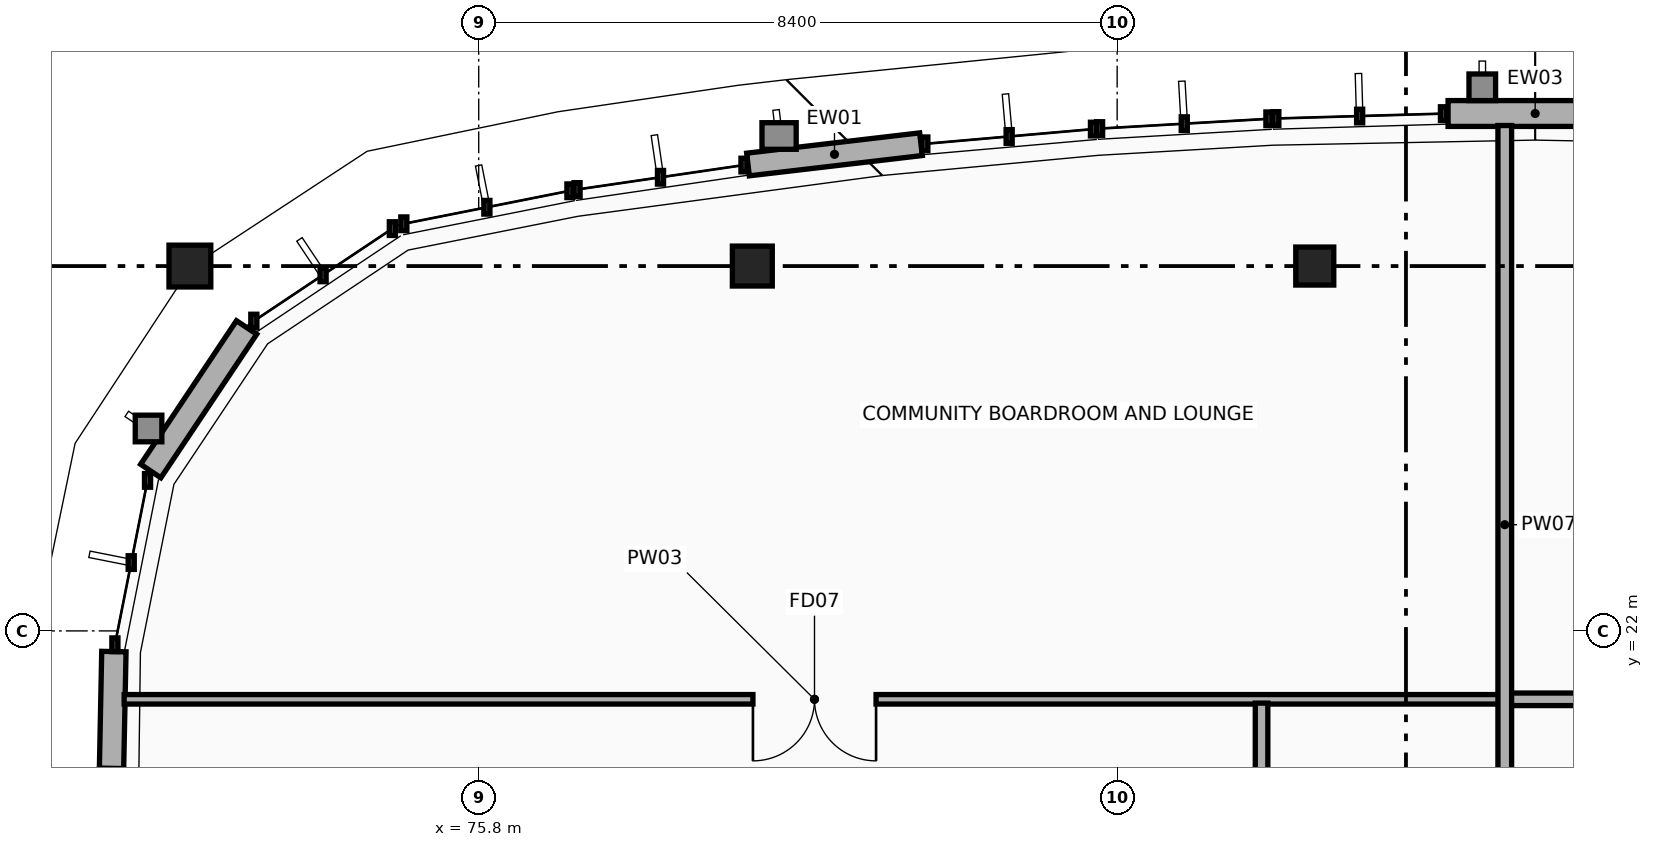
"""IFC4 building model, lengths in metres.
Left out: names, types, materials, properties, quantities, classifications, styles, units other than length and angle.
Written with IfcOpenShell. Run it as: python <this file> out.ifc"""

import sys

from ifc_helpers import new_model, si_unit, direction, frame, frame_2d, origin, origin_2d, place, context, subcontext, project, spatial, rectangle, extrude, element, fill, save


model = new_model("IFC4")
c1 = context("Model", 3, precision=1e-05, world=origin(), true_north=direction((0.0, 1.0)))
c2 = subcontext(c1, "Body", "Model", "MODEL_VIEW")
j1 = project(units=[si_unit("LENGTHUNIT", "METRE"), si_unit("PLANEANGLEUNIT", "RADIAN")], contexts=[c1])
p1 = place(None, origin())
s1 = spatial("IfcSite", under=j1, at=p1, CompositionType="ELEMENT")
p2 = place(p1, origin())
s2 = spatial("IfcBuilding", under=s1, at=p2, CompositionType="ELEMENT")
p3 = place(p2, frame((0.0, 0.0, 8.7)))
s3 = spatial("IfcBuildingStorey", under=s2, at=p3, CompositionType="ELEMENT", Elevation=8.7)
p4 = place(p3, frame((72.0, 26.8, 0.0), z_axis=(0.0, 0.0, 1.0), x_axis=(1.0, 0.0, 0.0)))
e1 = element("IfcColumn", 1, at=p4, inside=s3, PredefinedType="COLUMN", context=c2, shape_type="SweptSolid", body=[
    extrude(rectangle(XDim=0.55, YDim=0.55, at=origin_2d()), origin(), (0.0, 0.0, 1.0), 3.9),
])
p5 = place(p3, frame((79.4, 26.8, 0.0), z_axis=(0.0, 0.0, 1.0), x_axis=(1.0, 0.0, 0.0)))
e2 = element("IfcColumn", 2, at=p5, inside=s3, PredefinedType="COLUMN", context=c2, shape_type="SweptSolid", body=[
    extrude(rectangle(XDim=0.525, YDim=0.525, at=origin_2d()), origin(), (0.0, 0.0, 1.0), 3.9),
])
p6 = place(p3, frame((86.8, 26.8, 0.0), z_axis=(0.0, 0.0, 1.0), x_axis=(1.0, 0.0, 0.0)))
e3 = element("IfcColumn", 3, at=p6, inside=s3, PredefinedType="COLUMN", context=c2, shape_type="SweptSolid", body=[
    extrude(rectangle(XDim=0.5, YDim=0.5, at=origin_2d()), origin(), (0.0, 0.0, 1.0), 3.9),
])
p7 = place(p3, frame((88.554, 28.807, 0.0), z_axis=(0.0, 0.0, 1.0), x_axis=(1.0, 0.0, 0.0)))
e4 = element("IfcWall", 4, at=p7, inside=s3, PredefinedType="STANDARD", context=c2, shape_type="SweptSolid", body=[
    extrude(rectangle(XDim=2.292, YDim=0.34, at=frame_2d((1.146, 0.0))), origin(), (0.0, 0.0, 1.0), 3.664),
])
p8 = place(p3, frame((79.343, 28.136, 0.0), z_axis=(0.0, 0.0, 1.0), x_axis=(0.993184017059, 0.116556888507, 0.0)))
e5 = element("IfcWall", 5, at=p8, inside=s3, PredefinedType="STANDARD", context=c2, shape_type="SweptSolid", body=[
    extrude(rectangle(XDim=2.292, YDim=0.3, at=frame_2d((1.146, 0.0))), origin(), (0.0, 0.0, 1.0), 3.243),
])
p9 = place(p3, frame((71.485, 24.103, 0.0), z_axis=(0.0, 0.0, 1.0), x_axis=(0.555221033592, 0.831702833863, 0.0)))
e6 = element("IfcWall", 6, at=p9, inside=s3, PredefinedType="STANDARD", context=c2, shape_type="SweptSolid", body=[
    extrude(rectangle(XDim=2.271, YDim=0.32, at=frame_2d((1.136, 0.0))), origin(), (0.0, 0.0, 1.0), 3.075),
])
p10 = place(p3, frame((70.969, 20.192, 0.0), z_axis=(0.0, 0.0, 1.0), x_axis=(0.02018025071, 0.999796358006, 0.0)))
e7 = element("IfcWall", 7, at=p10, inside=s3, PredefinedType="STANDARD", context=c2, shape_type="SweptSolid", body=[
    extrude(rectangle(XDim=1.536, YDim=0.32, at=frame_2d((0.768, 0.0))), origin(), (0.0, 0.0, 1.0), 3.664),
])
p11 = place(p3, frame((89.3, 21.1, 0.0), z_axis=(0.0, 0.0, 1.0), x_axis=(-1.0, 0.0, 0.0)))
e8 = element("IfcWall", 8, at=p11, inside=s3, PredefinedType="PARTITIONING", context=c2, shape_type="SweptSolid", body=[
    extrude(rectangle(XDim=18.165, YDim=0.125, at=frame_2d((9.083, 0.0))), origin(), (0.0, 0.0, 1.0), 3.025),
])
p12 = place(p11, frame((8.272, 0.0, 0.0)))
e9 = element("IfcOpeningElement", 9, at=p12, cuts=e8, PredefinedType="OPENING", context=c2, shape_type="SweptSolid", body=[
    extrude(rectangle(XDim=1.62, YDim=2.32, at=frame_2d((0.81, 1.16))), frame((0.0, 0.073, 0.0), z_axis=(0.0, -1.0, 0.0), x_axis=(1.0, 0.0, 0.0)), (0.0, 0.0, 1.0), 0.145),
])
p13 = place(p3, frame((102.462, 21.1, 0.0), z_axis=(0.0, 0.0, 1.0), x_axis=(-1.0, 0.0, 0.0)))
e10 = element("IfcWall", 10, at=p13, inside=s3, PredefinedType="PARTITIONING", context=c2, shape_type="SweptSolid", body=[
    extrude(rectangle(XDim=13.162, YDim=0.165, at=frame_2d((6.581, 0.0))), origin(), (0.0, 0.0, 1.0), 2.95),
])
p14 = place(p13, frame((5.891, 0.0, 0.0)))
e11 = element("IfcOpeningElement", 11, at=p14, cuts=e10, PredefinedType="OPENING", context=c2, shape_type="SweptSolid", body=[
    extrude(rectangle(XDim=1.38, YDim=2.2, at=frame_2d((0.69, 1.1))), frame((0.0, 0.093, 0.0), z_axis=(0.0, -1.0, 0.0), x_axis=(1.0, 0.0, 0.0)), (0.0, 0.0, 1.0), 0.185),
])
p15 = place(p3, frame((86.1, 10.207, 0.0), z_axis=(0.0, 0.0, 1.0), x_axis=(0.0, 1.0, 0.0)))
e12 = element("IfcWall", 12, at=p15, inside=s3, PredefinedType="PARTITIONING", context=c2, shape_type="SweptSolid", body=[
    extrude(rectangle(XDim=10.843, YDim=0.165, at=frame_2d((5.421, 0.0))), origin(), (0.0, 0.0, 1.0), 3.194),
])
p16 = place(p3, frame((89.3, 18.146, 0.0), z_axis=(0.0, 0.0, 1.0), x_axis=(0.0, 1.0, 0.0)))
e13 = element("IfcWall", 13, at=p16, inside=s3, PredefinedType="PARTITIONING", context=c2, shape_type="SweptSolid", body=[
    extrude(rectangle(XDim=10.503, YDim=0.18, at=frame_2d((5.251, 0.0))), origin(), (0.0, 0.0, 1.0), 3.187),
])
p17 = place(p12, origin())
e14 = element("IfcDoor", 14, at=p17, inside=s3, OperationType="DOUBLE_DOOR_SINGLE_SWING", PredefinedType="DOOR", context=c2, shape_type="SweptSolid", body=[
    extrude(rectangle(XDim=1.62, YDim=2.32, at=frame_2d((0.81, 1.16))), frame((0.0, 0.025, 0.0), z_axis=(0.0, -1.0, 0.0), x_axis=(1.0, 0.0, 0.0)), (0.0, 0.0, 1.0), 0.05),
])
fill(e9, e14)
save(model, sys.argv[1])
